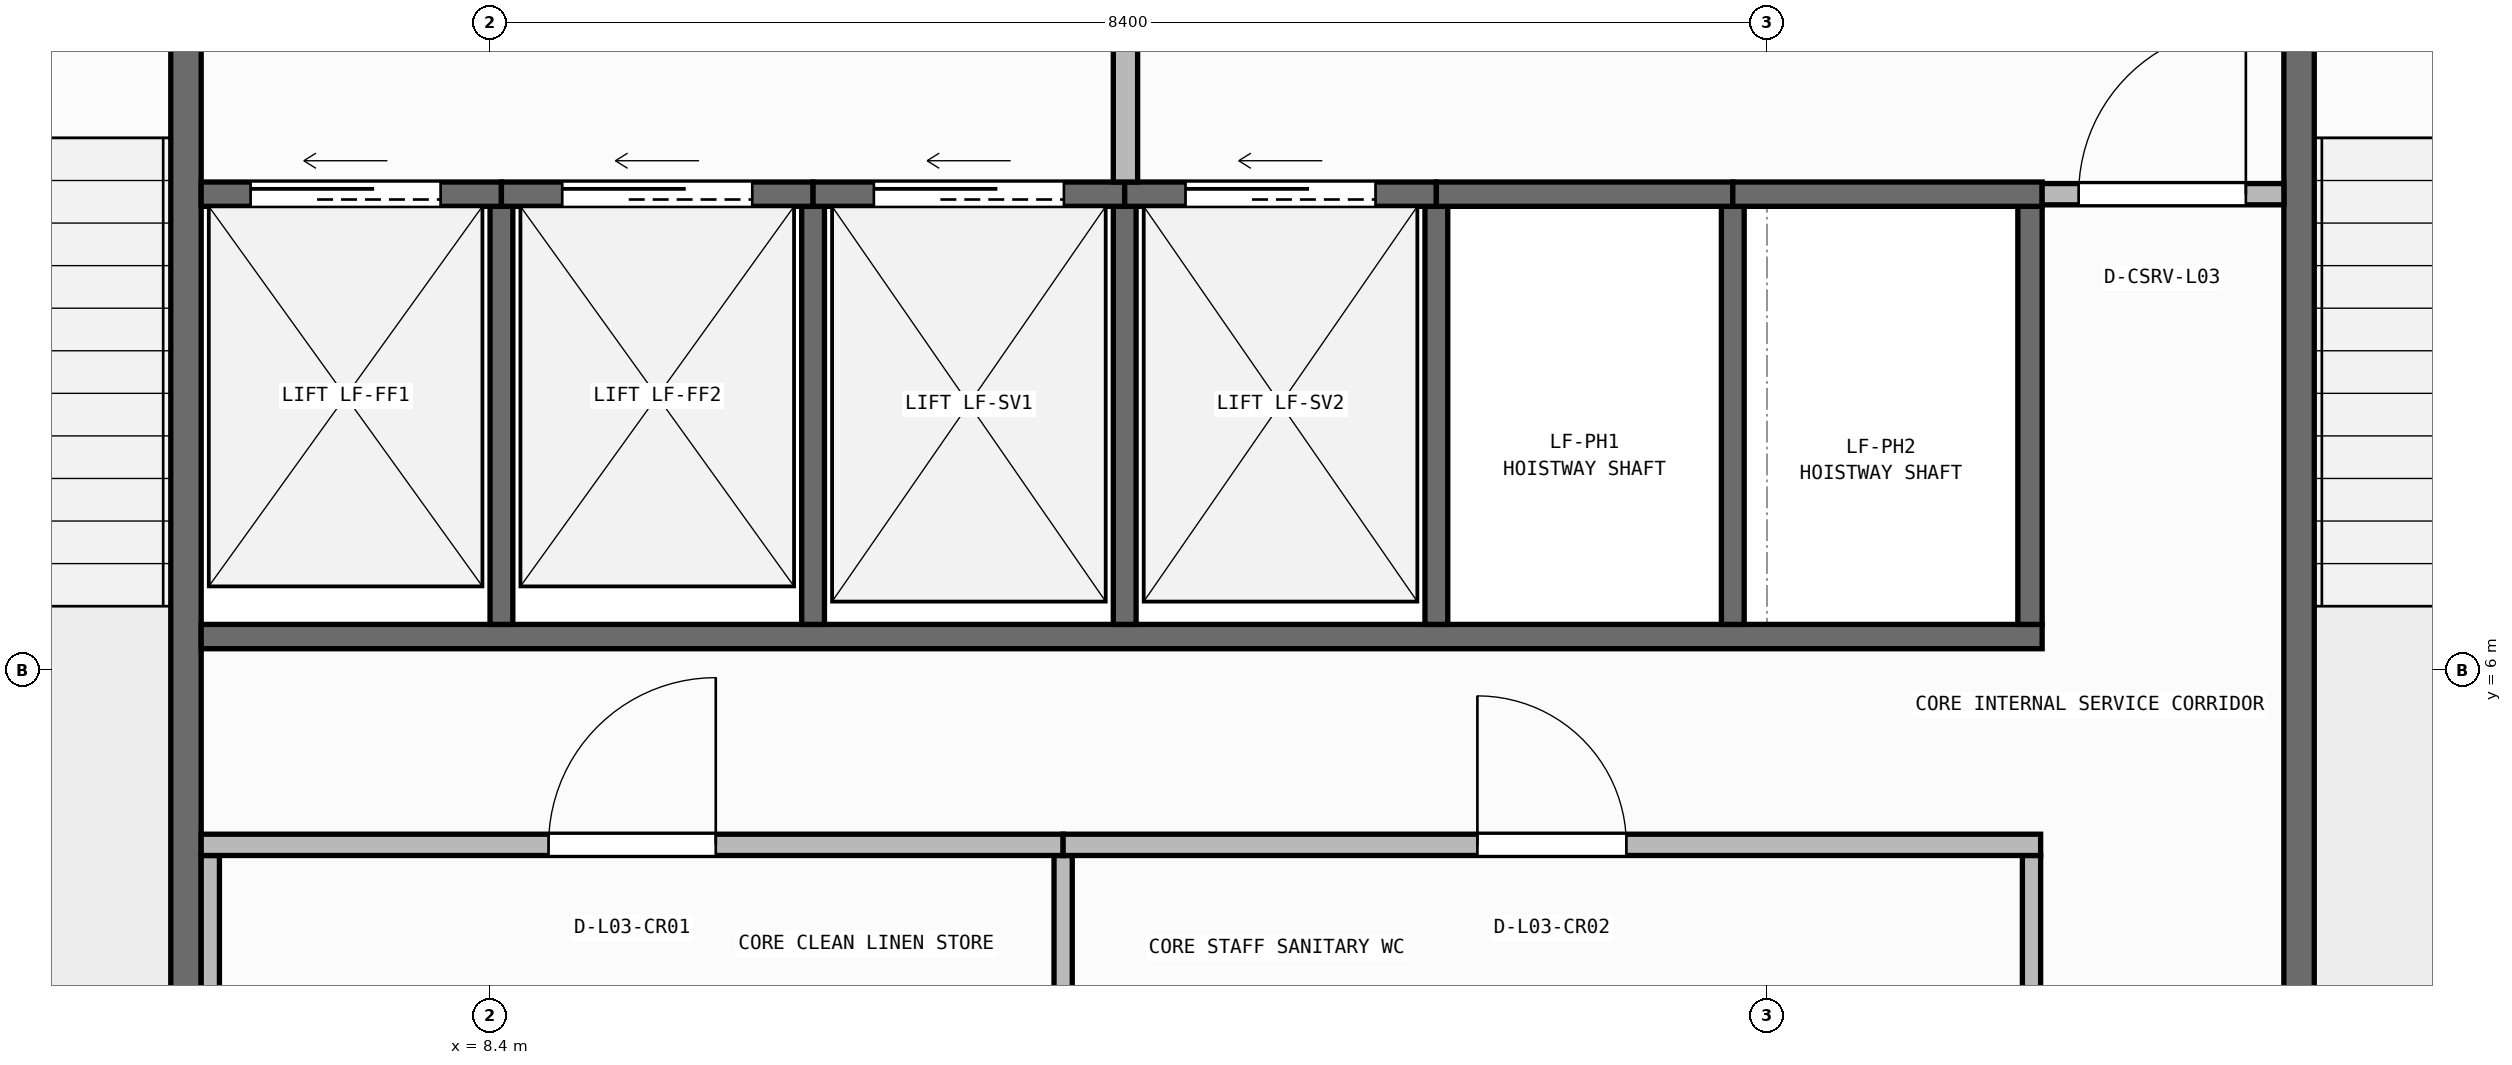
"""IFC4 building model, lengths in metres.
Left out: names, types, materials, properties, quantities, classifications, styles, units other than length and angle.
Written with IfcOpenShell. Run it as: python <this file> out.ifc"""

import sys

from ifc_helpers import new_model, si_unit, direction, frame, frame_2d, origin, place, context, subcontext, project, spatial, rectangle, extrude, element, fill, save


model = new_model("IFC4")
c1 = context("Model", 3, precision=1e-05, world=origin(), true_north=direction((0.0, 1.0)))
c2 = subcontext(c1, "Body", "Model", "MODEL_VIEW")
j1 = project(units=[si_unit("LENGTHUNIT", "METRE"), si_unit("PLANEANGLEUNIT", "RADIAN")], contexts=[c1])
p1 = place(None, origin())
s1 = spatial("IfcSite", under=j1, at=p1, CompositionType="ELEMENT")
p2 = place(p1, origin())
s2 = spatial("IfcBuilding", under=s1, at=p2, CompositionType="ELEMENT")
p3 = place(p2, frame((0.0, 0.0, 13.5)))
s3 = spatial("IfcBuildingStorey", under=s2, at=p3, CompositionType="ELEMENT", Elevation=13.5)
for number, where, z_axis, x_axis in (
    (1, (6.4, 3.5, 0.0), (0.0, 0.0, 1.0), (0.0, 1.0, 0.0)),
    (2, (20.3, 3.5, 0.0), (0.0, 0.0, 1.0), (0.0, 1.0, 0.0)),
):
    element("IfcWall", number, at=place(p3, frame(where, z_axis=z_axis, x_axis=x_axis)), inside=s3, PredefinedType="SHEAR", context=c2, shape_type="SweptSolid", body=[
        extrude(rectangle(XDim=7.6, YDim=0.2, at=frame_2d((3.8, 0.0))), origin(), (0.0, 0.0, 1.0), 4.25),
    ])
p4 = place(p3, frame((6.5, 6.22, 0.0), z_axis=(0.0, 0.0, 1.0), x_axis=(1.0, 0.0, 0.0)))
e3 = element("IfcWall", 3, at=p4, inside=s3, PredefinedType="SHEAR", context=c2, shape_type="SweptSolid", body=[
    extrude(rectangle(XDim=12.11, YDim=0.16, at=frame_2d((6.055, 0.0))), origin(), (0.0, 0.0, 1.0), 4.25),
])
p5 = place(p3, frame((18.53, 6.3, 0.0), z_axis=(0.0, 0.0, 1.0), x_axis=(0.0, 1.0, 0.0)))
e4 = element("IfcWall", 4, at=p5, inside=s3, PredefinedType="SHEAR", context=c2, shape_type="SweptSolid", body=[
    extrude(rectangle(XDim=2.75, YDim=0.16, at=frame_2d((1.375, 0.0))), origin(), (0.0, 0.0, 1.0), 4.25),
])
for number, where, z_axis, x_axis in (
    (5, (8.475, 6.3, 0.0), (0.0, 0.0, 1.0), (0.0, 1.0, 0.0)),
    (6, (10.525, 6.3, 0.0), (0.0, 0.0, 1.0), (0.0, 1.0, 0.0)),
    (7, (12.575, 6.3, 0.0), (0.0, 0.0, 1.0), (0.0, 1.0, 0.0)),
    (8, (14.625, 6.3, 0.0), (0.0, 0.0, 1.0), (0.0, 1.0, 0.0)),
    (9, (16.575, 6.3, 0.0), (0.0, 0.0, 1.0), (0.0, 1.0, 0.0)),
):
    element("IfcWall", number, at=place(p3, frame(where, z_axis=z_axis, x_axis=x_axis)), inside=s3, PredefinedType="SHEAR", context=c2, shape_type="SweptSolid", body=[
        extrude(rectangle(XDim=2.75, YDim=0.15, at=frame_2d((1.375, 0.0))), origin(), (0.0, 0.0, 1.0), 4.25),
    ])
p6 = place(p3, frame((6.5, 9.13, 0.0), z_axis=(0.0, 0.0, 1.0), x_axis=(1.0, 0.0, 0.0)))
e10 = element("IfcWall", 10, at=p6, inside=s3, PredefinedType="SHEAR", context=c2, shape_type="SweptSolid", body=[
    extrude(rectangle(XDim=1.975, YDim=0.16, at=frame_2d((0.988, 0.0))), origin(), (0.0, 0.0, 1.0), 4.25),
])
p7 = place(p6, frame((0.325, 0.0, 0.0)))
e11 = element("IfcOpeningElement", 11, at=p7, cuts=e10, PredefinedType="OPENING", context=c2, shape_type="SweptSolid", body=[
    extrude(rectangle(XDim=1.25, YDim=2.15, at=frame_2d((0.625, 1.075))), frame((0.0, 0.09, 0.0), z_axis=(0.0, -1.0, 0.0), x_axis=(1.0, 0.0, 0.0)), (0.0, 0.0, 1.0), 0.18),
])
p8 = place(p3, frame((8.475, 9.13, 0.0), z_axis=(0.0, 0.0, 1.0), x_axis=(1.0, 0.0, 0.0)))
e12 = element("IfcWall", 12, at=p8, inside=s3, PredefinedType="SHEAR", context=c2, shape_type="SweptSolid", body=[
    extrude(rectangle(XDim=2.05, YDim=0.16, at=frame_2d((1.025, 0.0))), origin(), (0.0, 0.0, 1.0), 4.25),
])
p9 = place(p8, frame((0.4, 0.0, 0.0)))
e13 = element("IfcOpeningElement", 13, at=p9, cuts=e12, PredefinedType="OPENING", context=c2, shape_type="SweptSolid", body=[
    extrude(rectangle(XDim=1.25, YDim=2.15, at=frame_2d((0.625, 1.075))), frame((0.0, 0.09, 0.0), z_axis=(0.0, -1.0, 0.0), x_axis=(1.0, 0.0, 0.0)), (0.0, 0.0, 1.0), 0.18),
])
p10 = place(p3, frame((10.525, 9.13, 0.0), z_axis=(0.0, 0.0, 1.0), x_axis=(1.0, 0.0, 0.0)))
e14 = element("IfcWall", 14, at=p10, inside=s3, PredefinedType="SHEAR", context=c2, shape_type="SweptSolid", body=[
    extrude(rectangle(XDim=2.05, YDim=0.16, at=frame_2d((1.025, 0.0))), origin(), (0.0, 0.0, 1.0), 4.25),
])
p11 = place(p10, frame((0.4, 0.0, 0.0)))
e15 = element("IfcOpeningElement", 15, at=p11, cuts=e14, PredefinedType="OPENING", context=c2, shape_type="SweptSolid", body=[
    extrude(rectangle(XDim=1.25, YDim=2.15, at=frame_2d((0.625, 1.075))), frame((0.0, 0.09, 0.0), z_axis=(0.0, -1.0, 0.0), x_axis=(1.0, 0.0, 0.0)), (0.0, 0.0, 1.0), 0.18),
])
p12 = place(p3, frame((12.575, 9.13, 0.0), z_axis=(0.0, 0.0, 1.0), x_axis=(1.0, 0.0, 0.0)))
e16 = element("IfcWall", 16, at=p12, inside=s3, PredefinedType="SHEAR", context=c2, shape_type="SweptSolid", body=[
    extrude(rectangle(XDim=2.05, YDim=0.16, at=frame_2d((1.025, 0.0))), origin(), (0.0, 0.0, 1.0), 4.25),
])
p13 = place(p12, frame((0.4, 0.0, 0.0)))
e17 = element("IfcOpeningElement", 17, at=p13, cuts=e16, PredefinedType="OPENING", context=c2, shape_type="SweptSolid", body=[
    extrude(rectangle(XDim=1.25, YDim=2.15, at=frame_2d((0.625, 1.075))), frame((0.0, 0.09, 0.0), z_axis=(0.0, -1.0, 0.0), x_axis=(1.0, 0.0, 0.0)), (0.0, 0.0, 1.0), 0.18),
])
p14 = place(p3, frame((14.625, 9.13, 0.0), z_axis=(0.0, 0.0, 1.0), x_axis=(1.0, 0.0, 0.0)))
e18 = element("IfcWall", 18, at=p14, inside=s3, PredefinedType="SHEAR", context=c2, shape_type="SweptSolid", body=[
    extrude(rectangle(XDim=1.95, YDim=0.16, at=frame_2d((0.975, 0.0))), origin(), (0.0, 0.0, 1.0), 4.25),
])
p15 = place(p3, frame((16.575, 9.13, 0.0), z_axis=(0.0, 0.0, 1.0), x_axis=(1.0, 0.0, 0.0)))
e19 = element("IfcWall", 19, at=p15, inside=s3, PredefinedType="SHEAR", context=c2, shape_type="SweptSolid", body=[
    extrude(rectangle(XDim=2.035, YDim=0.16, at=frame_2d((1.018, 0.0))), origin(), (0.0, 0.0, 1.0), 4.25),
])
for number, where, z_axis, x_axis in (
    (20, (6.56, 3.52, 0.0), (0.0, 0.0, 1.0), (0.0, 1.0, 0.0)),
    (21, (12.17, 3.52, 0.0), (0.0, 0.0, 1.0), (0.0, 1.0, 0.0)),
    (22, (18.54, 3.52, 0.0), (0.0, 0.0, 1.0), (0.0, 1.0, 0.0)),
):
    element("IfcWall", number, at=place(p3, frame(where, z_axis=z_axis, x_axis=x_axis)), inside=s3, PredefinedType="PARTITIONING", context=c2, shape_type="SweptSolid", body=[
        extrude(rectangle(XDim=1.26, YDim=0.12, at=frame_2d((0.63, 0.0))), origin(), (0.0, 0.0, 1.0), 4.25),
    ])
p16 = place(p3, frame((6.5, 4.85, 0.0), z_axis=(0.0, 0.0, 1.0), x_axis=(1.0, 0.0, 0.0)))
e23 = element("IfcWall", 23, at=p16, inside=s3, PredefinedType="PARTITIONING", context=c2, shape_type="SweptSolid", body=[
    extrude(rectangle(XDim=5.67, YDim=0.14, at=frame_2d((2.835, 0.0))), origin(), (0.0, 0.0, 1.0), 4.25),
])
p17 = place(p16, frame((2.285, 0.0, 0.0)))
e24 = element("IfcOpeningElement", 24, at=p17, cuts=e23, PredefinedType="OPENING", context=c2, shape_type="SweptSolid", body=[
    extrude(rectangle(XDim=1.1, YDim=2.1, at=frame_2d((0.55, 1.05))), frame((0.0, 0.08, 0.0), z_axis=(0.0, -1.0, 0.0), x_axis=(1.0, 0.0, 0.0)), (0.0, 0.0, 1.0), 0.16),
])
p18 = place(p3, frame((12.17, 4.85, 0.0), z_axis=(0.0, 0.0, 1.0), x_axis=(1.0, 0.0, 0.0)))
e25 = element("IfcWall", 25, at=p18, inside=s3, PredefinedType="PARTITIONING", context=c2, shape_type="SweptSolid", body=[
    extrude(rectangle(XDim=6.43, YDim=0.14, at=frame_2d((3.215, 0.0))), origin(), (0.0, 0.0, 1.0), 4.25),
])
p19 = place(p18, frame((2.725, 0.0, 0.0)))
e26 = element("IfcOpeningElement", 26, at=p19, cuts=e25, PredefinedType="OPENING", context=c2, shape_type="SweptSolid", body=[
    extrude(rectangle(XDim=0.98, YDim=2.1, at=frame_2d((0.49, 1.05))), frame((0.0, 0.08, 0.0), z_axis=(0.0, -1.0, 0.0), x_axis=(1.0, 0.0, 0.0)), (0.0, 0.0, 1.0), 0.16),
])
p20 = place(p3, frame((18.61, 9.13, 0.0), z_axis=(0.0, 0.0, 1.0), x_axis=(1.0, 0.0, 0.0)))
e27 = element("IfcWall", 27, at=p20, inside=s3, PredefinedType="PARTITIONING", context=c2, shape_type="SweptSolid", body=[
    extrude(rectangle(XDim=1.59, YDim=0.14, at=frame_2d((0.795, 0.0))), origin(), (0.0, 0.0, 1.0), 4.25),
])
p21 = place(p20, frame((0.24, 0.0, 0.0)))
e28 = element("IfcOpeningElement", 28, at=p21, cuts=e27, PredefinedType="OPENING", context=c2, shape_type="SweptSolid", body=[
    extrude(rectangle(XDim=1.1, YDim=2.1, at=frame_2d((0.55, 1.05))), frame((0.0, 0.08, 0.0), z_axis=(0.0, -1.0, 0.0), x_axis=(1.0, 0.0, 0.0)), (0.0, 0.0, 1.0), 0.16),
])
p22 = place(p3, frame((12.58, 9.21, 0.0), z_axis=(0.0, 0.0, 1.0), x_axis=(0.0, 1.0, 0.0)))
e29 = element("IfcWall", 29, at=p22, inside=s3, PredefinedType="PARTITIONING", context=c2, shape_type="SweptSolid", body=[
    extrude(rectangle(XDim=2.79, YDim=0.16, at=frame_2d((1.395, 0.0))), origin(), (0.0, 0.0, 1.0), 4.25),
])
p23 = place(p7, origin())
e30 = element("IfcDoor", 30, at=p23, inside=s3, OperationType="SLIDING_TO_LEFT", PredefinedType="DOOR", context=c2, shape_type="SweptSolid", body=[
    extrude(rectangle(XDim=1.25, YDim=2.15, at=frame_2d((0.625, 1.075))), frame((0.0, 0.025, 0.0), z_axis=(0.0, -1.0, 0.0), x_axis=(1.0, 0.0, 0.0)), (0.0, 0.0, 1.0), 0.05),
])
fill(e11, e30)
p24 = place(p9, origin())
e31 = element("IfcDoor", 31, at=p24, inside=s3, OperationType="SLIDING_TO_LEFT", PredefinedType="DOOR", context=c2, shape_type="SweptSolid", body=[
    extrude(rectangle(XDim=1.25, YDim=2.15, at=frame_2d((0.625, 1.075))), frame((0.0, 0.025, 0.0), z_axis=(0.0, -1.0, 0.0), x_axis=(1.0, 0.0, 0.0)), (0.0, 0.0, 1.0), 0.05),
])
fill(e13, e31)
p25 = place(p11, origin())
e32 = element("IfcDoor", 32, at=p25, inside=s3, OperationType="SLIDING_TO_LEFT", PredefinedType="DOOR", context=c2, shape_type="SweptSolid", body=[
    extrude(rectangle(XDim=1.25, YDim=2.15, at=frame_2d((0.625, 1.075))), frame((0.0, 0.025, 0.0), z_axis=(0.0, -1.0, 0.0), x_axis=(1.0, 0.0, 0.0)), (0.0, 0.0, 1.0), 0.05),
])
fill(e15, e32)
p26 = place(p13, origin())
e33 = element("IfcDoor", 33, at=p26, inside=s3, OperationType="SLIDING_TO_LEFT", PredefinedType="DOOR", context=c2, shape_type="SweptSolid", body=[
    extrude(rectangle(XDim=1.25, YDim=2.15, at=frame_2d((0.625, 1.075))), frame((0.0, 0.025, 0.0), z_axis=(0.0, -1.0, 0.0), x_axis=(1.0, 0.0, 0.0)), (0.0, 0.0, 1.0), 0.05),
])
fill(e17, e33)
p27 = place(p17, origin())
e34 = element("IfcDoor", 34, at=p27, inside=s3, OperationType="SINGLE_SWING_RIGHT", PredefinedType="DOOR", context=c2, shape_type="SweptSolid", body=[
    extrude(rectangle(XDim=1.1, YDim=2.1, at=frame_2d((0.55, 1.05))), frame((0.0, 0.025, 0.0), z_axis=(0.0, -1.0, 0.0), x_axis=(1.0, 0.0, 0.0)), (0.0, 0.0, 1.0), 0.05),
])
fill(e24, e34)
p28 = place(p19, origin())
e35 = element("IfcDoor", 35, at=p28, inside=s3, OperationType="SINGLE_SWING_LEFT", PredefinedType="DOOR", context=c2, shape_type="SweptSolid", body=[
    extrude(rectangle(XDim=0.98, YDim=2.1, at=frame_2d((0.49, 1.05))), frame((0.0, 0.025, 0.0), z_axis=(0.0, -1.0, 0.0), x_axis=(1.0, 0.0, 0.0)), (0.0, 0.0, 1.0), 0.05),
])
fill(e26, e35)
p29 = place(p21, origin())
e36 = element("IfcDoor", 36, at=p29, inside=s3, OperationType="SINGLE_SWING_RIGHT", PredefinedType="DOOR", context=c2, shape_type="SweptSolid", body=[
    extrude(rectangle(XDim=1.1, YDim=2.1, at=frame_2d((0.55, 1.05))), frame((0.0, 0.025, 0.0), z_axis=(0.0, -1.0, 0.0), x_axis=(1.0, 0.0, 0.0)), (0.0, 0.0, 1.0), 0.05),
])
fill(e28, e36)
save(model, sys.argv[1])
